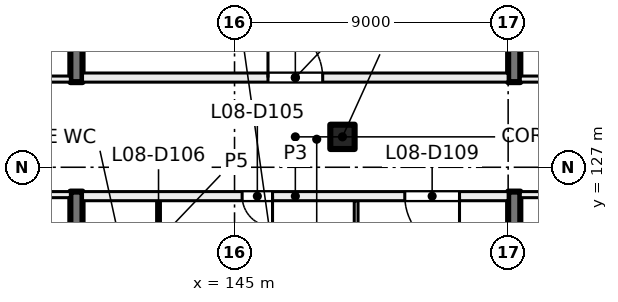
"""IFC4 building model, lengths in metres.
Left out: names, types, materials, properties, quantities, classifications, styles, units other than length and angle.
Written with IfcOpenShell. Run it as: python <this file> out.ifc"""

import sys

from ifc_helpers import new_model, si_unit, direction, frame, frame_2d, origin, origin_2d, place, context, subcontext, project, spatial, rectangle, extrude, element, fill, save


model = new_model("IFC4")
c1 = context("Model", 3, precision=1e-05, world=origin(), true_north=direction((0.0, 1.0)))
c2 = subcontext(c1, "Body", "Model", "MODEL_VIEW")
j1 = project(units=[si_unit("LENGTHUNIT", "METRE"), si_unit("PLANEANGLEUNIT", "RADIAN")], contexts=[c1])
p1 = place(None, origin())
s1 = spatial("IfcSite", under=j1, at=p1, CompositionType="ELEMENT")
p2 = place(p1, origin())
s2 = spatial("IfcBuilding", under=s1, at=p2, CompositionType="ELEMENT")
p3 = place(p2, frame((0.0, 0.0, 39.5)))
s3 = spatial("IfcBuildingStorey", under=s2, at=p3, CompositionType="ELEMENT", Elevation=39.5)
p4 = place(p3, frame((148.55, 128.0, 0.0), z_axis=(0.0, 0.0, 1.0), x_axis=(1.0, 0.0, 0.0)))
e1 = element("IfcColumn", 1, at=p4, inside=s3, PredefinedType="COLUMN", context=c2, shape_type="SweptSolid", body=[
    extrude(rectangle(XDim=0.8, YDim=0.8, at=origin_2d()), origin(), (0.0, 0.0, 1.0), 4.0),
])
for number, where, z_axis, x_axis in (
    (2, (139.8, 117.6, 0.0), (0.0, 0.0, 1.0), (0.0, 1.0, 0.0)),
    (3, (139.8, 129.8, 0.0), (0.0, 0.0, 1.0), (0.0, 1.0, 0.0)),
    (4, (154.2, 138.4, 0.0), (0.0, 0.0, 1.0), (0.0, -1.0, 0.0)),
    (5, (154.2, 126.2, 0.0), (0.0, 0.0, 1.0), (0.0, -1.0, 0.0)),
):
    element("IfcWall", number, at=place(p3, frame(where, z_axis=z_axis, x_axis=x_axis)), inside=s3, PredefinedType="SHEAR", context=c2, shape_type="SweptSolid", body=[
        extrude(rectangle(XDim=8.6, YDim=0.4, at=frame_2d((4.3, 0.0))), origin(), (0.0, 0.0, 1.0), 4.0),
    ])
p5 = place(p3, frame((135.0, 129.9, 0.0), z_axis=(0.0, 0.0, 1.0), x_axis=(1.0, 0.0, 0.0)))
e6 = element("IfcWall", 6, at=p5, inside=s3, PredefinedType="PARTITIONING", context=c2, shape_type="SweptSolid", body=[
    extrude(rectangle(XDim=4.6, YDim=0.2, at=frame_2d((2.3, 0.0))), origin(), (0.0, 0.0, 1.0), 3.625),
])
p6 = place(p5, frame((1.7, 0.0, 0.0)))
e7 = element("IfcOpeningElement", 7, at=p6, cuts=e6, PredefinedType="OPENING", context=c2, shape_type="SweptSolid", body=[
    extrude(rectangle(XDim=1.2, YDim=2.1, at=frame_2d((0.6, 1.05))), frame((0.0, 0.11, 0.0), z_axis=(0.0, -1.0, 0.0), x_axis=(1.0, 0.0, 0.0)), (0.0, 0.0, 1.0), 0.22),
])
p7 = place(p3, frame((139.6, 126.1, 0.0), z_axis=(0.0, 0.0, 1.0), x_axis=(-1.0, 0.0, 0.0)))
e8 = element("IfcWall", 8, at=p7, inside=s3, PredefinedType="PARTITIONING", context=c2, shape_type="SweptSolid", body=[
    extrude(rectangle(XDim=4.6, YDim=0.2, at=frame_2d((2.3, 0.0))), origin(), (0.0, 0.0, 1.0), 3.625),
])
p8 = place(p7, frame((1.7, 0.0, 0.0)))
e9 = element("IfcOpeningElement", 9, at=p8, cuts=e8, PredefinedType="OPENING", context=c2, shape_type="SweptSolid", body=[
    extrude(rectangle(XDim=1.2, YDim=2.1, at=frame_2d((0.6, 1.05))), frame((0.0, 0.11, 0.0), z_axis=(0.0, -1.0, 0.0), x_axis=(1.0, 0.0, 0.0)), (0.0, 0.0, 1.0), 0.22),
])
p9 = place(p3, frame((163.8, 126.1, 0.0), z_axis=(0.0, 0.0, 1.0), x_axis=(-1.0, 0.0, 0.0)))
e10 = element("IfcWall", 10, at=p9, inside=s3, PredefinedType="PARTITIONING", context=c2, shape_type="SweptSolid", body=[
    extrude(rectangle(XDim=9.4, YDim=0.2, at=frame_2d((4.7, 0.0))), origin(), (0.0, 0.0, 1.0), 3.625),
])
p10 = place(p9, frame((4.1, 0.0, 0.0)))
e11 = element("IfcOpeningElement", 11, at=p10, cuts=e10, PredefinedType="OPENING", context=c2, shape_type="SweptSolid", body=[
    extrude(rectangle(XDim=1.2, YDim=2.1, at=frame_2d((0.6, 1.05))), frame((0.0, 0.11, 0.0), z_axis=(0.0, -1.0, 0.0), x_axis=(1.0, 0.0, 0.0)), (0.0, 0.0, 1.0), 0.22),
])
p11 = place(p3, frame((154.4, 129.9, 0.0), z_axis=(0.0, 0.0, 1.0), x_axis=(1.0, 0.0, 0.0)))
e12 = element("IfcWall", 12, at=p11, inside=s3, PredefinedType="PARTITIONING", context=c2, shape_type="SweptSolid", body=[
    extrude(rectangle(XDim=9.4, YDim=0.2, at=frame_2d((4.7, 0.0))), origin(), (0.0, 0.0, 1.0), 3.625),
])
p12 = place(p11, frame((4.1, 0.0, 0.0)))
e13 = element("IfcOpeningElement", 13, at=p12, cuts=e12, PredefinedType="OPENING", context=c2, shape_type="SweptSolid", body=[
    extrude(rectangle(XDim=1.2, YDim=2.1, at=frame_2d((0.6, 1.05))), frame((0.0, 0.11, 0.0), z_axis=(0.0, -1.0, 0.0), x_axis=(1.0, 0.0, 0.0)), (0.0, 0.0, 1.0), 0.22),
])
p13 = place(p3, frame((140.0, 129.95, 0.0), z_axis=(0.0, 0.0, 1.0), x_axis=(1.0, 0.0, 0.0)))
e14 = element("IfcWall", 14, at=p13, inside=s3, PredefinedType="PARTITIONING", context=c2, shape_type="SweptSolid", body=[
    extrude(rectangle(XDim=14.0, YDim=0.3, at=frame_2d((7.0, 0.0))), origin(), (0.0, 0.0, 1.0), 3.625),
])
p14 = place(p13, frame((6.1, 0.0, 0.0)))
e15 = element("IfcOpeningElement", 15, at=p14, cuts=e14, PredefinedType="OPENING", context=c2, shape_type="SweptSolid", body=[
    extrude(rectangle(XDim=1.8, YDim=2.1, at=frame_2d((0.9, 1.05))), frame((0.0, 0.16, 0.0), z_axis=(0.0, -1.0, 0.0), x_axis=(1.0, 0.0, 0.0)), (0.0, 0.0, 1.0), 0.32),
])
p15 = place(p3, frame((142.5, 123.312, 0.0), z_axis=(0.0, 0.0, 1.0), x_axis=(0.0, 1.0, 0.0)))
e16 = element("IfcWall", 16, at=p15, inside=s3, PredefinedType="PARTITIONING", context=c2, shape_type="SweptSolid", body=[
    extrude(rectangle(XDim=2.588, YDim=0.125, at=frame_2d((1.294, 0.0))), origin(), (0.0, 0.0, 1.0), 3.625),
])
p16 = place(p15, frame((0.794, 0.0, 0.0)))
e17 = element("IfcOpeningElement", 17, at=p16, cuts=e16, PredefinedType="OPENING", context=c2, shape_type="SweptSolid", body=[
    extrude(rectangle(XDim=1.0, YDim=2.1, at=frame_2d((0.5, 1.05))), frame((0.0, 0.073, 0.0), z_axis=(0.0, -1.0, 0.0), x_axis=(1.0, 0.0, 0.0)), (0.0, 0.0, 1.0), 0.145),
])
p17 = place(p3, frame((149.0, 116.988, 0.0), z_axis=(0.0, 0.0, 1.0), x_axis=(0.0, 1.0, 0.0)))
e18 = element("IfcWall", 18, at=p17, inside=s3, PredefinedType="PARTITIONING", context=c2, shape_type="SweptSolid", body=[
    extrude(rectangle(XDim=8.912, YDim=0.125, at=frame_2d((4.456, 0.0))), origin(), (0.0, 0.0, 1.0), 3.625),
])
p18 = place(p3, frame((154.0, 126.05, 0.0), z_axis=(0.0, 0.0, 1.0), x_axis=(-1.0, 0.0, 0.0)))
e19 = element("IfcWall", 19, at=p18, inside=s3, PredefinedType="PARTITIONING", context=c2, shape_type="SweptSolid", body=[
    extrude(rectangle(XDim=14.0, YDim=0.3, at=frame_2d((7.0, 0.0))), origin(), (0.0, 0.0, 1.0), 3.625),
])
p19 = place(p18, frame((7.75, 0.0, 0.0)))
e20 = element("IfcOpeningElement", 20, at=p19, cuts=e19, PredefinedType="OPENING", context=c2, shape_type="SweptSolid", body=[
    extrude(rectangle(XDim=1.0, YDim=2.1, at=frame_2d((0.5, 1.05))), frame((0.0, 0.16, 0.0), z_axis=(0.0, -1.0, 0.0), x_axis=(1.0, 0.0, 0.0)), (0.0, 0.0, 1.0), 0.32),
])
p20 = place(p18, frame((1.6, 0.0, 0.0)))
e21 = element("IfcOpeningElement", 21, at=p20, cuts=e19, PredefinedType="OPENING", context=c2, shape_type="SweptSolid", body=[
    extrude(rectangle(XDim=1.8, YDim=2.1, at=frame_2d((0.9, 1.05))), frame((0.0, 0.16, 0.0), z_axis=(0.0, -1.0, 0.0), x_axis=(1.0, 0.0, 0.0)), (0.0, 0.0, 1.0), 0.32),
])
p21 = place(p14, origin())
e22 = element("IfcDoor", 22, at=p21, inside=s3, OperationType="DOUBLE_DOOR_SINGLE_SWING", PredefinedType="DOOR", context=c2, shape_type="SweptSolid", body=[
    extrude(rectangle(XDim=1.8, YDim=2.1, at=frame_2d((0.9, 1.05))), frame((0.0, 0.025, 0.0), z_axis=(0.0, -1.0, 0.0), x_axis=(1.0, 0.0, 0.0)), (0.0, 0.0, 1.0), 0.05),
])
fill(e15, e22)
p22 = place(p19, origin())
e23 = element("IfcDoor", 23, at=p22, inside=s3, OperationType="SINGLE_SWING_RIGHT", PredefinedType="DOOR", context=c2, shape_type="SweptSolid", body=[
    extrude(rectangle(XDim=1.0, YDim=2.1, at=frame_2d((0.5, 1.05))), frame((0.0, 0.025, 0.0), z_axis=(0.0, -1.0, 0.0), x_axis=(1.0, 0.0, 0.0)), (0.0, 0.0, 1.0), 0.05),
])
fill(e20, e23)
p23 = place(p20, origin())
e24 = element("IfcDoor", 24, at=p23, inside=s3, OperationType="DOUBLE_DOOR_SINGLE_SWING", PredefinedType="DOOR", context=c2, shape_type="SweptSolid", body=[
    extrude(rectangle(XDim=1.8, YDim=2.1, at=frame_2d((0.9, 1.05))), frame((0.0, 0.025, 0.0), z_axis=(0.0, -1.0, 0.0), x_axis=(1.0, 0.0, 0.0)), (0.0, 0.0, 1.0), 0.05),
])
fill(e21, e24)
save(model, sys.argv[1])
